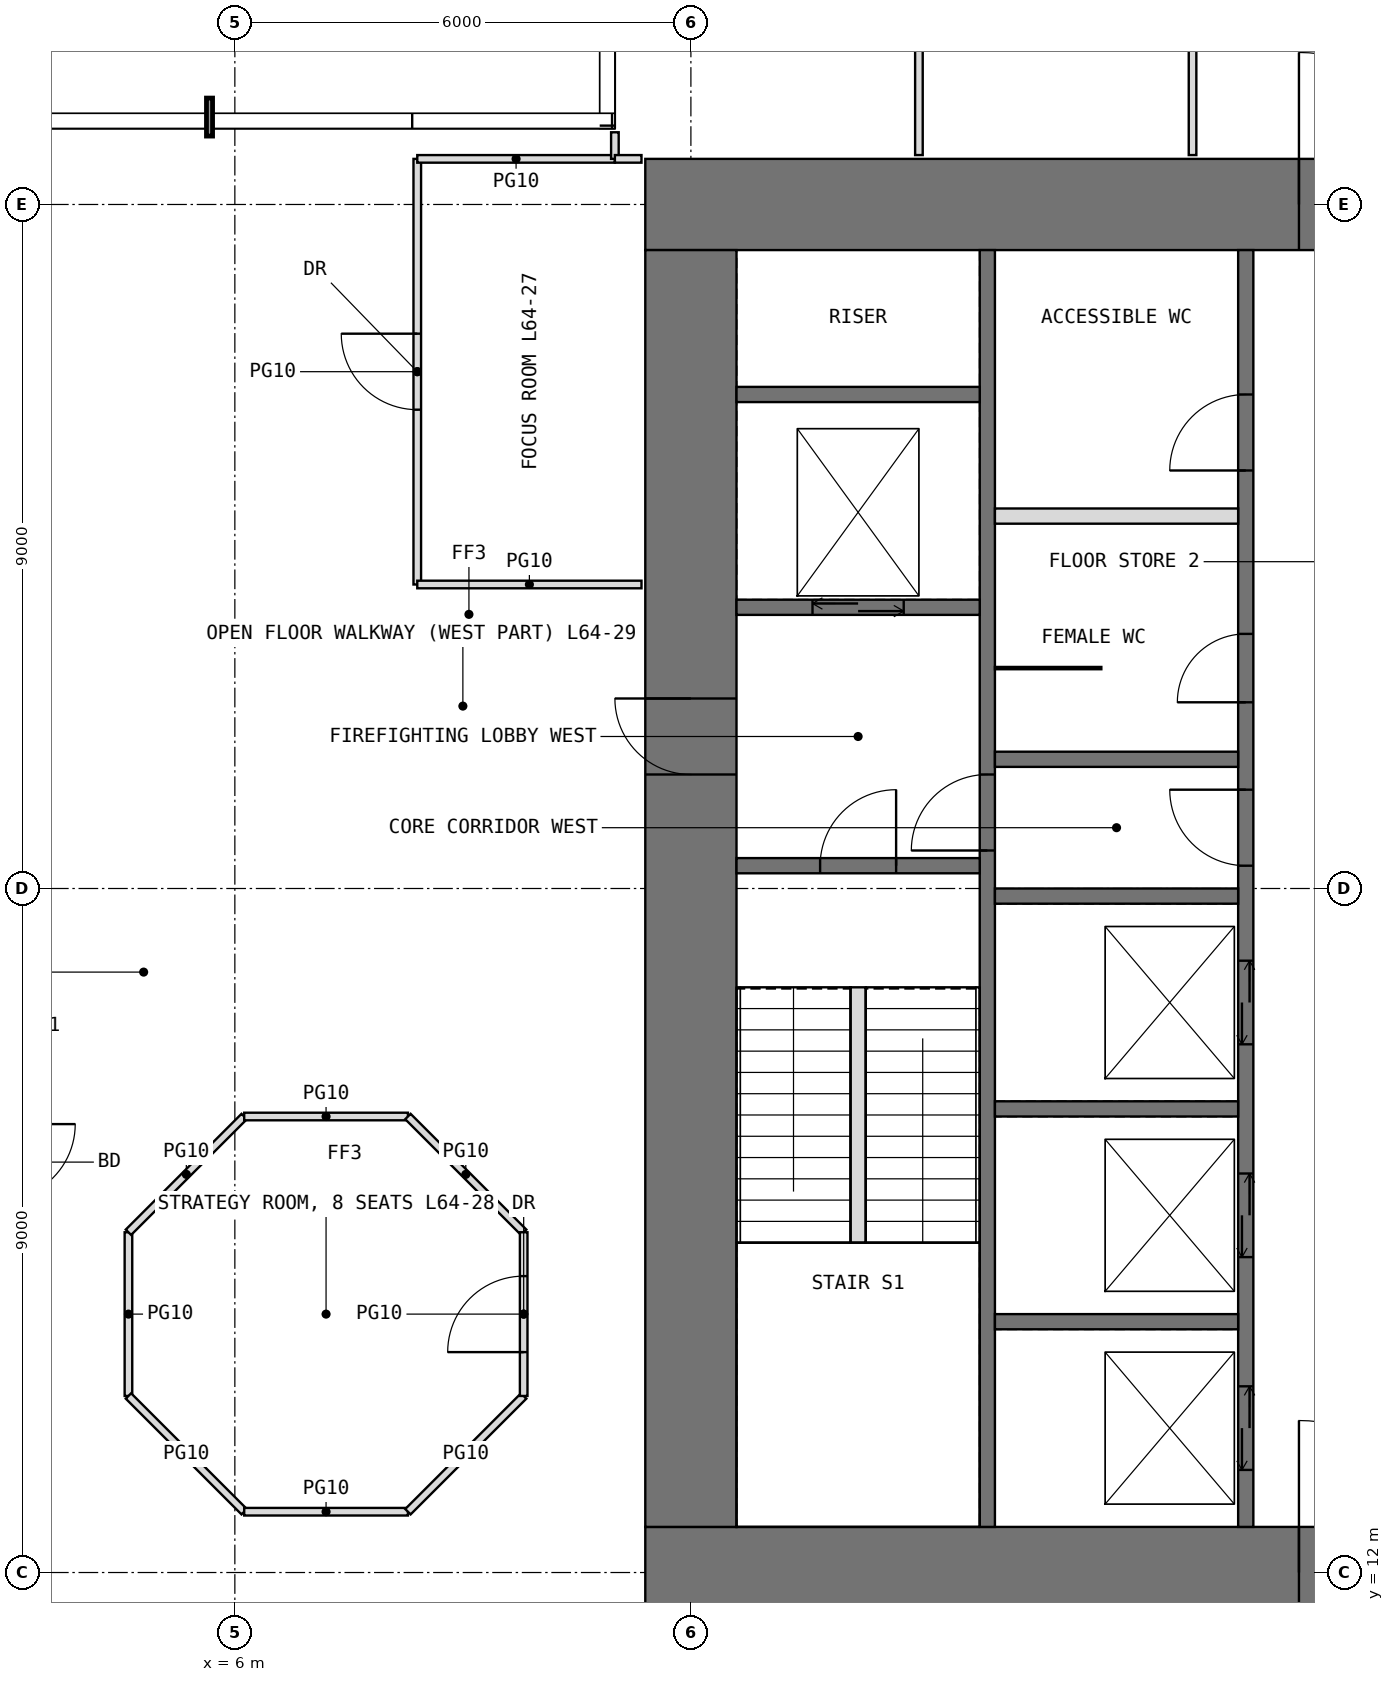
"""IFC4 building model, lengths in metres.
Left out: names, types, materials, properties, quantities, classifications, styles, units other than length and angle.
Written with IfcOpenShell. Run it as: python <this file> out.ifc"""

import sys

from ifc_helpers import new_model, si_unit, direction, frame, frame_2d, origin, place, context, subcontext, project, spatial, rectangle, extrude, element, fill, save


model = new_model("IFC4")
c1 = context("Model", 3, precision=1e-05, world=origin(), true_north=direction((0.0, 1.0)))
c2 = subcontext(c1, "Body", "Model", "MODEL_VIEW")
j1 = project(units=[si_unit("LENGTHUNIT", "METRE"), si_unit("PLANEANGLEUNIT", "RADIAN")], contexts=[c1])
p1 = place(None, origin())
s1 = spatial("IfcSite", under=j1, at=p1, CompositionType="ELEMENT")
p2 = place(p1, origin())
s2 = spatial("IfcBuilding", under=s1, at=p2, CompositionType="ELEMENT")
p3 = place(p2, frame((0.0, 0.0, 269.2)))
s3 = spatial("IfcBuildingStorey", under=s2, at=p3, CompositionType="ELEMENT", Elevation=269.2)
p4 = place(p3, frame((11.4, 12.0, -0.05), z_axis=(0.0, 0.0, 1.0), x_axis=(1.0, 0.0, 0.0)))
e1 = element("IfcWall", 1, at=p4, inside=s3, PredefinedType="SHEAR", context=c2, shape_type="SweptSolid", body=[
    extrude(rectangle(XDim=19.2, YDim=1.2, at=frame_2d((9.6, 0.0))), origin(), (0.0, 0.0, 1.0), 4.2),
])
p5 = place(p4, frame((8.6, 0.0, 0.05)))
e2 = element("IfcOpeningElement", 2, at=p5, cuts=e1, PredefinedType="OPENING", context=c2, shape_type="SweptSolid", body=[
    extrude(rectangle(XDim=2.0, YDim=2.2, at=frame_2d((1.0, 1.1))), frame((0.0, 0.61, 0.0), z_axis=(0.0, -1.0, 0.0), x_axis=(1.0, 0.0, 0.0)), (0.0, 0.0, 1.0), 1.22),
])
p6 = place(p3, frame((11.4, 30.0, -0.05), z_axis=(0.0, 0.0, 1.0), x_axis=(1.0, 0.0, 0.0)))
e3 = element("IfcWall", 3, at=p6, inside=s3, PredefinedType="SHEAR", context=c2, shape_type="SweptSolid", body=[
    extrude(rectangle(XDim=19.2, YDim=1.2, at=frame_2d((9.6, 0.0))), origin(), (0.0, 0.0, 1.0), 4.2),
])
p7 = place(p6, frame((8.6, 0.0, 0.05)))
e4 = element("IfcOpeningElement", 4, at=p7, cuts=e3, PredefinedType="OPENING", context=c2, shape_type="SweptSolid", body=[
    extrude(rectangle(XDim=2.0, YDim=2.2, at=frame_2d((1.0, 1.1))), frame((0.0, 0.61, 0.0), z_axis=(0.0, -1.0, 0.0), x_axis=(1.0, 0.0, 0.0)), (0.0, 0.0, 1.0), 1.22),
])
p8 = place(p3, frame((12.0, 12.6, -0.05), z_axis=(0.0, 0.0, 1.0), x_axis=(0.0, 1.0, 0.0)))
e5 = element("IfcWall", 5, at=p8, inside=s3, PredefinedType="SHEAR", context=c2, shape_type="SweptSolid", body=[
    extrude(rectangle(XDim=16.8, YDim=1.2, at=frame_2d((8.4, 0.0))), origin(), (0.0, 0.0, 1.0), 4.2),
])
p9 = place(p8, frame((9.9, 0.0, 0.05)))
e6 = element("IfcOpeningElement", 6, at=p9, cuts=e5, PredefinedType="OPENING", context=c2, shape_type="SweptSolid", body=[
    extrude(rectangle(XDim=1.0, YDim=2.2, at=frame_2d((0.5, 1.1))), frame((0.0, 0.61, 0.0), z_axis=(0.0, -1.0, 0.0), x_axis=(1.0, 0.0, 0.0)), (0.0, 0.0, 1.0), 1.22),
])
p10 = place(p3, frame((15.9, 12.6, -0.05), z_axis=(0.0, 0.0, 1.0), x_axis=(0.0, 1.0, 0.0)))
e7 = element("IfcWall", 7, at=p10, inside=s3, PredefinedType="SHEAR", context=c2, shape_type="SweptSolid", body=[
    extrude(rectangle(XDim=16.8, YDim=0.2, at=frame_2d((8.4, 0.0))), origin(), (0.0, 0.0, 1.0), 4.2),
])
p11 = place(p10, frame((8.9, 0.0, 0.05)))
e8 = element("IfcOpeningElement", 8, at=p11, cuts=e7, PredefinedType="OPENING", context=c2, shape_type="SweptSolid", body=[
    extrude(rectangle(XDim=1.0, YDim=2.2, at=frame_2d((0.5, 1.1))), frame((0.0, 0.11, 0.0), z_axis=(0.0, -1.0, 0.0), x_axis=(1.0, 0.0, 0.0)), (0.0, 0.0, 1.0), 0.22),
])
p12 = place(p3, frame((19.3, 12.6, -0.05), z_axis=(0.0, 0.0, 1.0), x_axis=(0.0, 1.0, 0.0)))
e9 = element("IfcWall", 9, at=p12, inside=s3, PredefinedType="SHEAR", context=c2, shape_type="SweptSolid", body=[
    extrude(rectangle(XDim=16.8, YDim=0.2, at=frame_2d((8.4, 0.0))), origin(), (0.0, 0.0, 1.0), 4.2),
])
p13 = place(p12, frame((8.7, 0.0, 0.05)))
e10 = element("IfcOpeningElement", 10, at=p13, cuts=e9, PredefinedType="OPENING", context=c2, shape_type="SweptSolid", body=[
    extrude(rectangle(XDim=1.0, YDim=2.2, at=frame_2d((0.5, 1.1))), frame((0.0, 0.11, 0.0), z_axis=(0.0, -1.0, 0.0), x_axis=(1.0, 0.0, 0.0)), (0.0, 0.0, 1.0), 0.22),
])
p14 = place(p12, frame((10.85, 0.0, 0.05)))
e11 = element("IfcOpeningElement", 11, at=p14, cuts=e9, PredefinedType="OPENING", context=c2, shape_type="SweptSolid", body=[
    extrude(rectangle(XDim=0.9, YDim=2.2, at=frame_2d((0.45, 1.1))), frame((0.0, 0.11, 0.0), z_axis=(0.0, -1.0, 0.0), x_axis=(1.0, 0.0, 0.0)), (0.0, 0.0, 1.0), 0.22),
])
p15 = place(p12, frame((13.9, 0.0, 0.05)))
e12 = element("IfcOpeningElement", 12, at=p15, cuts=e9, PredefinedType="OPENING", context=c2, shape_type="SweptSolid", body=[
    extrude(rectangle(XDim=1.0, YDim=2.2, at=frame_2d((0.5, 1.1))), frame((0.0, 0.11, 0.0), z_axis=(0.0, -1.0, 0.0), x_axis=(1.0, 0.0, 0.0)), (0.0, 0.0, 1.0), 0.22),
])
p16 = place(p12, frame((0.75, 0.0, 0.05)))
e13 = element("IfcOpeningElement", 13, at=p16, cuts=e9, PredefinedType="OPENING", context=c2, shape_type="SweptSolid", body=[
    extrude(rectangle(XDim=1.1, YDim=2.2, at=frame_2d((0.55, 1.1))), frame((0.0, 0.11, 0.0), z_axis=(0.0, -1.0, 0.0), x_axis=(1.0, 0.0, 0.0)), (0.0, 0.0, 1.0), 0.22),
])
p17 = place(p12, frame((3.55, 0.0, 0.05)))
e14 = element("IfcOpeningElement", 14, at=p17, cuts=e9, PredefinedType="OPENING", context=c2, shape_type="SweptSolid", body=[
    extrude(rectangle(XDim=1.1, YDim=2.2, at=frame_2d((0.55, 1.1))), frame((0.0, 0.11, 0.0), z_axis=(0.0, -1.0, 0.0), x_axis=(1.0, 0.0, 0.0)), (0.0, 0.0, 1.0), 0.22),
])
p18 = place(p12, frame((6.35, 0.0, 0.05)))
e15 = element("IfcOpeningElement", 15, at=p18, cuts=e9, PredefinedType="OPENING", context=c2, shape_type="SweptSolid", body=[
    extrude(rectangle(XDim=1.1, YDim=2.2, at=frame_2d((0.55, 1.1))), frame((0.0, 0.11, 0.0), z_axis=(0.0, -1.0, 0.0), x_axis=(1.0, 0.0, 0.0)), (0.0, 0.0, 1.0), 0.22),
])
p19 = place(p3, frame((12.6, 21.3, -0.05), z_axis=(0.0, 0.0, 1.0), x_axis=(1.0, 0.0, 0.0)))
e16 = element("IfcWall", 16, at=p19, inside=s3, PredefinedType="SHEAR", context=c2, shape_type="SweptSolid", body=[
    extrude(rectangle(XDim=3.2, YDim=0.2, at=frame_2d((1.6, 0.0))), origin(), (0.0, 0.0, 1.0), 4.2),
])
p20 = place(p19, frame((1.1, 0.0, 0.05)))
e17 = element("IfcOpeningElement", 17, at=p20, cuts=e16, PredefinedType="OPENING", context=c2, shape_type="SweptSolid", body=[
    extrude(rectangle(XDim=1.0, YDim=2.2, at=frame_2d((0.5, 1.1))), frame((0.0, 0.11, 0.0), z_axis=(0.0, -1.0, 0.0), x_axis=(1.0, 0.0, 0.0)), (0.0, 0.0, 1.0), 0.22),
])
p21 = place(p3, frame((12.6, 24.7, -0.05), z_axis=(0.0, 0.0, 1.0), x_axis=(1.0, 0.0, 0.0)))
e18 = element("IfcWall", 18, at=p21, inside=s3, PredefinedType="SHEAR", context=c2, shape_type="SweptSolid", body=[
    extrude(rectangle(XDim=3.2, YDim=0.2, at=frame_2d((1.6, 0.0))), origin(), (0.0, 0.0, 1.0), 4.2),
])
p22 = place(p21, frame((1.0, 0.0, 0.05)))
e19 = element("IfcOpeningElement", 19, at=p22, cuts=e18, PredefinedType="OPENING", context=c2, shape_type="SweptSolid", body=[
    extrude(rectangle(XDim=1.2, YDim=2.2, at=frame_2d((0.6, 1.1))), frame((0.0, 0.11, 0.0), z_axis=(0.0, -1.0, 0.0), x_axis=(1.0, 0.0, 0.0)), (0.0, 0.0, 1.0), 0.22),
])
for number, where, z_axis, x_axis in (
    (20, (12.6, 27.5, -0.05), (0.0, 0.0, 1.0), (1.0, 0.0, 0.0)),
    (21, (16.0, 15.3, -0.05), (0.0, 0.0, 1.0), (1.0, 0.0, 0.0)),
    (22, (16.0, 18.1, -0.05), (0.0, 0.0, 1.0), (1.0, 0.0, 0.0)),
    (23, (16.0, 20.9, -0.05), (0.0, 0.0, 1.0), (1.0, 0.0, 0.0)),
    (24, (16.0, 22.7, -0.05), (0.0, 0.0, 1.0), (1.0, 0.0, 0.0)),
):
    element("IfcWall", number, at=place(p3, frame(where, z_axis=z_axis, x_axis=x_axis)), inside=s3, PredefinedType="SHEAR", context=c2, shape_type="SweptSolid", body=[
        extrude(rectangle(XDim=3.2, YDim=0.2, at=frame_2d((1.6, 0.0))), origin(), (0.0, 0.0, 1.0), 4.2),
    ])
p23 = place(p3, frame((16.0, 25.9, 0.0), z_axis=(0.0, 0.0, 1.0), x_axis=(1.0, 0.0, 0.0)))
e25 = element("IfcWall", 25, at=p23, inside=s3, PredefinedType="PARTITIONING", context=c2, shape_type="SweptSolid", body=[
    extrude(rectangle(XDim=3.2, YDim=0.2, at=frame_2d((1.6, 0.0))), origin(), (0.0, 0.0, 1.0), 3.95),
])
p24 = place(p3, frame((16.0, 23.9, 0.0), z_axis=(0.0, 0.0, 1.0), x_axis=(1.0, 0.0, 0.0)))
e26 = element("IfcWall", 26, at=p24, inside=s3, PredefinedType="PARTITIONING", context=c2, shape_type="SweptSolid", body=[
    extrude(rectangle(XDim=1.4, YDim=0.03, at=frame_2d((0.7, 0.0))), origin(), (0.0, 0.0, 1.0), 3.95),
])
p25 = place(p3, frame((4.6, 14.323, 0.0), z_axis=(0.0, 0.0, 1.0), x_axis=(0.0, 1.0, 0.0)))
e27 = element("IfcWall", 27, at=p25, inside=s3, PredefinedType="PARTITIONING", context=c2, shape_type="SweptSolid", body=[
    extrude(rectangle(XDim=2.154, YDim=0.1, at=frame_2d((1.077, 0.0))), origin(), (0.0, 0.0, 1.0), 3.95),
])
for number, where, z_axis, x_axis in (
    (28, (4.6, 14.323, 0.0), (0.0, 0.0, 1.0), (0.707, -0.707, 0.0)),
    (29, (4.6, 16.477, 0.0), (0.0, 0.0, 1.0), (0.707, 0.707, 0.0)),
):
    element("IfcWall", number, at=place(p3, frame(where, z_axis=z_axis, x_axis=x_axis)), inside=s3, PredefinedType="PARTITIONING", context=c2, shape_type="SweptSolid", body=[
        extrude(rectangle(XDim=2.154, YDim=0.1, at=frame_2d((1.077, 0.0))), origin(), (0.0, 0.0, 1.0), 3.95),
    ])
for number, where, z_axis, x_axis in (
    (30, (6.123, 12.8, 0.0), (0.0, 0.0, 1.0), (1.0, 0.0, 0.0)),
    (31, (6.123, 18.0, 0.0), (0.0, 0.0, 1.0), (1.0, 0.0, 0.0)),
):
    element("IfcWall", number, at=place(p3, frame(where, z_axis=z_axis, x_axis=x_axis)), inside=s3, PredefinedType="PARTITIONING", context=c2, shape_type="SweptSolid", body=[
        extrude(rectangle(XDim=2.154, YDim=0.1, at=frame_2d((1.077, 0.0))), origin(), (0.0, 0.0, 1.0), 3.95),
    ])
for number, where, z_axis, x_axis in (
    (32, (8.277, 12.8, 0.0), (0.0, 0.0, 1.0), (0.707, 0.707, 0.0)),
    (33, (8.277, 18.0, 0.0), (0.0, 0.0, 1.0), (0.707, -0.707, 0.0)),
):
    element("IfcWall", number, at=place(p3, frame(where, z_axis=z_axis, x_axis=x_axis)), inside=s3, PredefinedType="PARTITIONING", context=c2, shape_type="SweptSolid", body=[
        extrude(rectangle(XDim=2.154, YDim=0.1, at=frame_2d((1.077, 0.0))), origin(), (0.0, 0.0, 1.0), 3.95),
    ])
p26 = place(p3, frame((8.4, 25.0, 0.0), z_axis=(0.0, 0.0, 1.0), x_axis=(0.0, 1.0, 0.0)))
e34 = element("IfcWall", 34, at=p26, inside=s3, PredefinedType="PARTITIONING", context=c2, shape_type="SweptSolid", body=[
    extrude(rectangle(XDim=5.6, YDim=0.1, at=frame_2d((2.8, 0.0))), origin(), (0.0, 0.0, 1.0), 3.95),
])
p27 = place(p26, frame((2.3, 0.0, 0.0)))
e35 = element("IfcOpeningElement", 35, at=p27, cuts=e34, PredefinedType="OPENING", context=c2, shape_type="SweptSolid", body=[
    extrude(rectangle(XDim=1.0, YDim=2.2, at=frame_2d((0.5, 1.1))), frame((0.0, 0.06, 0.0), z_axis=(0.0, -1.0, 0.0), x_axis=(1.0, 0.0, 0.0)), (0.0, 0.0, 1.0), 0.12),
])
p28 = place(p3, frame((8.4, 25.0, 0.0), z_axis=(0.0, 0.0, 1.0), x_axis=(1.0, 0.0, 0.0)))
e36 = element("IfcWall", 36, at=p28, inside=s3, PredefinedType="PARTITIONING", context=c2, shape_type="SweptSolid", body=[
    extrude(rectangle(XDim=2.95, YDim=0.1, at=frame_2d((1.475, 0.0))), origin(), (0.0, 0.0, 1.0), 3.95),
])
p29 = place(p3, frame((8.4, 30.6, 0.0), z_axis=(0.0, 0.0, 1.0), x_axis=(1.0, 0.0, 0.0)))
e37 = element("IfcWall", 37, at=p29, inside=s3, PredefinedType="PARTITIONING", context=c2, shape_type="SweptSolid", body=[
    extrude(rectangle(XDim=2.6, YDim=0.1, at=frame_2d((1.3, 0.0))), origin(), (0.0, 0.0, 1.0), 3.95),
])
p30 = place(p3, frame((9.8, 14.323, 0.0), z_axis=(0.0, 0.0, 1.0), x_axis=(0.0, 1.0, 0.0)))
e38 = element("IfcWall", 38, at=p30, inside=s3, PredefinedType="PARTITIONING", context=c2, shape_type="SweptSolid", body=[
    extrude(rectangle(XDim=2.154, YDim=0.1, at=frame_2d((1.077, 0.0))), origin(), (0.0, 0.0, 1.0), 3.95),
])
p31 = place(p30, frame((0.577, 0.0, 0.0)))
e39 = element("IfcOpeningElement", 39, at=p31, cuts=e38, PredefinedType="OPENING", context=c2, shape_type="SweptSolid", body=[
    extrude(rectangle(XDim=1.0, YDim=2.2, at=frame_2d((0.5, 1.1))), frame((0.0, 0.06, 0.0), z_axis=(0.0, -1.0, 0.0), x_axis=(1.0, 0.0, 0.0)), (0.0, 0.0, 1.0), 0.12),
])
p32 = place(p3, frame((11.0, 30.6, 0.0), z_axis=(0.0, 0.0, 1.0), x_axis=(0.0, 1.0, 0.0)))
e40 = element("IfcWall", 40, at=p32, inside=s3, PredefinedType="PARTITIONING", context=c2, shape_type="SweptSolid", body=[
    extrude(rectangle(XDim=0.35, YDim=0.1, at=frame_2d((0.175, 0.0))), origin(), (0.0, 0.0, 1.0), 3.95),
])
p33 = place(p3, frame((11.0, 30.6, 0.0), z_axis=(0.0, 0.0, 1.0), x_axis=(1.0, 0.0, 0.0)))
e41 = element("IfcWall", 41, at=p33, inside=s3, PredefinedType="PARTITIONING", context=c2, shape_type="SweptSolid", body=[
    extrude(rectangle(XDim=0.35, YDim=0.1, at=frame_2d((0.175, 0.0))), origin(), (0.0, 0.0, 1.0), 3.95),
])
p34 = place(p3, frame((15.0, 30.65, 0.0), z_axis=(0.0, 0.0, 1.0), x_axis=(0.0, 1.0, 0.0)))
e42 = element("IfcWall", 42, at=p34, inside=s3, PredefinedType="PARTITIONING", context=c2, shape_type="SweptSolid", body=[
    extrude(rectangle(XDim=3.45, YDim=0.1, at=frame_2d((1.725, 0.0))), origin(), (0.0, 0.0, 1.0), 3.95),
])
p35 = place(p3, frame((18.6, 30.65, 0.0), z_axis=(0.0, 0.0, 1.0), x_axis=(0.0, 1.0, 0.0)))
e43 = element("IfcWall", 43, at=p35, inside=s3, PredefinedType="PARTITIONING", context=c2, shape_type="SweptSolid", body=[
    extrude(rectangle(XDim=3.95, YDim=0.1, at=frame_2d((1.975, 0.0))), origin(), (0.0, 0.0, 1.0), 3.95),
])
p36 = place(p3, frame((14.2, 16.34, 0.0), z_axis=(0.0, 0.0, 1.0), x_axis=(0.0, 1.0, 0.0)))
e44 = element("IfcWall", 44, at=p36, inside=s3, PredefinedType="PARTITIONING", context=c2, shape_type="SweptSolid", body=[
    extrude(rectangle(XDim=3.36, YDim=0.2, at=frame_2d((1.68, 0.0))), origin(), (0.0, 0.0, 1.0), 4.2),
])
p37 = place(p5, origin())
e45 = element("IfcDoor", 45, at=p37, inside=s3, OperationType="DOUBLE_DOOR_SINGLE_SWING", PredefinedType="DOOR", context=c2, shape_type="SweptSolid", body=[
    extrude(rectangle(XDim=2.0, YDim=2.2, at=frame_2d((1.0, 1.1))), frame((0.0, 0.025, 0.0), z_axis=(0.0, -1.0, 0.0), x_axis=(1.0, 0.0, 0.0)), (0.0, 0.0, 1.0), 0.05),
])
fill(e2, e45)
p38 = place(p7, origin())
e46 = element("IfcDoor", 46, at=p38, inside=s3, OperationType="DOUBLE_DOOR_SINGLE_SWING", PredefinedType="DOOR", context=c2, shape_type="SweptSolid", body=[
    extrude(rectangle(XDim=2.0, YDim=2.2, at=frame_2d((1.0, 1.1))), frame((0.0, 0.025, 0.0), z_axis=(0.0, -1.0, 0.0), x_axis=(1.0, 0.0, 0.0)), (0.0, 0.0, 1.0), 0.05),
])
fill(e4, e46)
p39 = place(p9, origin())
e47 = element("IfcDoor", 47, at=p39, inside=s3, OperationType="SINGLE_SWING_RIGHT", PredefinedType="DOOR", context=c2, shape_type="SweptSolid", body=[
    extrude(rectangle(XDim=1.0, YDim=2.2, at=frame_2d((0.5, 1.1))), frame((0.0, 0.025, 0.0), z_axis=(0.0, -1.0, 0.0), x_axis=(1.0, 0.0, 0.0)), (0.0, 0.0, 1.0), 0.05),
])
fill(e6, e47)
p40 = place(p20, origin())
e48 = element("IfcDoor", 48, at=p40, inside=s3, OperationType="SINGLE_SWING_RIGHT", PredefinedType="DOOR", context=c2, shape_type="SweptSolid", body=[
    extrude(rectangle(XDim=1.0, YDim=2.2, at=frame_2d((0.5, 1.1))), frame((0.0, 0.025, 0.0), z_axis=(0.0, -1.0, 0.0), x_axis=(1.0, 0.0, 0.0)), (0.0, 0.0, 1.0), 0.05),
])
fill(e17, e48)
p41 = place(p11, origin())
e49 = element("IfcDoor", 49, at=p41, inside=s3, OperationType="SINGLE_SWING_LEFT", PredefinedType="DOOR", context=c2, shape_type="SweptSolid", body=[
    extrude(rectangle(XDim=1.0, YDim=2.2, at=frame_2d((0.5, 1.1))), frame((0.0, 0.025, 0.0), z_axis=(0.0, -1.0, 0.0), x_axis=(1.0, 0.0, 0.0)), (0.0, 0.0, 1.0), 0.05),
])
fill(e8, e49)
p42 = place(p13, origin())
e50 = element("IfcDoor", 50, at=p42, inside=s3, OperationType="SINGLE_SWING_RIGHT", PredefinedType="DOOR", context=c2, shape_type="SweptSolid", body=[
    extrude(rectangle(XDim=1.0, YDim=2.2, at=frame_2d((0.5, 1.1))), frame((0.0, 0.025, 0.0), z_axis=(0.0, -1.0, 0.0), x_axis=(1.0, 0.0, 0.0)), (0.0, 0.0, 1.0), 0.05),
])
fill(e10, e50)
p43 = place(p14, origin())
e51 = element("IfcDoor", 51, at=p43, inside=s3, OperationType="SINGLE_SWING_LEFT", PredefinedType="DOOR", context=c2, shape_type="SweptSolid", body=[
    extrude(rectangle(XDim=0.9, YDim=2.2, at=frame_2d((0.45, 1.1))), frame((0.0, 0.025, 0.0), z_axis=(0.0, -1.0, 0.0), x_axis=(1.0, 0.0, 0.0)), (0.0, 0.0, 1.0), 0.05),
])
fill(e11, e51)
p44 = place(p15, origin())
e52 = element("IfcDoor", 52, at=p44, inside=s3, OperationType="SINGLE_SWING_LEFT", PredefinedType="DOOR", context=c2, shape_type="SweptSolid", body=[
    extrude(rectangle(XDim=1.0, YDim=2.2, at=frame_2d((0.5, 1.1))), frame((0.0, 0.025, 0.0), z_axis=(0.0, -1.0, 0.0), x_axis=(1.0, 0.0, 0.0)), (0.0, 0.0, 1.0), 0.05),
])
fill(e12, e52)
p45 = place(p27, origin())
e53 = element("IfcDoor", 53, at=p45, inside=s3, OperationType="SINGLE_SWING_RIGHT", PredefinedType="DOOR", context=c2, shape_type="SweptSolid", body=[
    extrude(rectangle(XDim=1.0, YDim=2.2, at=frame_2d((0.5, 1.1))), frame((0.0, 0.025, 0.0), z_axis=(0.0, -1.0, 0.0), x_axis=(1.0, 0.0, 0.0)), (0.0, 0.0, 1.0), 0.05),
])
fill(e35, e53)
p46 = place(p31, origin())
e54 = element("IfcDoor", 54, at=p46, inside=s3, OperationType="SINGLE_SWING_LEFT", PredefinedType="DOOR", context=c2, shape_type="SweptSolid", body=[
    extrude(rectangle(XDim=1.0, YDim=2.2, at=frame_2d((0.5, 1.1))), frame((0.0, 0.025, 0.0), z_axis=(0.0, -1.0, 0.0), x_axis=(1.0, 0.0, 0.0)), (0.0, 0.0, 1.0), 0.05),
])
fill(e39, e54)
p47 = place(p16, origin())
e55 = element("IfcDoor", 55, at=p47, inside=s3, OperationType="DOUBLE_DOOR_SLIDING", PredefinedType="DOOR", context=c2, shape_type="SweptSolid", body=[
    extrude(rectangle(XDim=1.1, YDim=2.2, at=frame_2d((0.55, 1.1))), frame((0.0, 0.025, 0.0), z_axis=(0.0, -1.0, 0.0), x_axis=(1.0, 0.0, 0.0)), (0.0, 0.0, 1.0), 0.05),
])
fill(e13, e55)
p48 = place(p17, origin())
e56 = element("IfcDoor", 56, at=p48, inside=s3, OperationType="DOUBLE_DOOR_SLIDING", PredefinedType="DOOR", context=c2, shape_type="SweptSolid", body=[
    extrude(rectangle(XDim=1.1, YDim=2.2, at=frame_2d((0.55, 1.1))), frame((0.0, 0.025, 0.0), z_axis=(0.0, -1.0, 0.0), x_axis=(1.0, 0.0, 0.0)), (0.0, 0.0, 1.0), 0.05),
])
fill(e14, e56)
p49 = place(p18, origin())
e57 = element("IfcDoor", 57, at=p49, inside=s3, OperationType="DOUBLE_DOOR_SLIDING", PredefinedType="DOOR", context=c2, shape_type="SweptSolid", body=[
    extrude(rectangle(XDim=1.1, YDim=2.2, at=frame_2d((0.55, 1.1))), frame((0.0, 0.025, 0.0), z_axis=(0.0, -1.0, 0.0), x_axis=(1.0, 0.0, 0.0)), (0.0, 0.0, 1.0), 0.05),
])
fill(e15, e57)
p50 = place(p22, origin())
e58 = element("IfcDoor", 58, at=p50, inside=s3, OperationType="DOUBLE_DOOR_SLIDING", PredefinedType="DOOR", context=c2, shape_type="SweptSolid", body=[
    extrude(rectangle(XDim=1.2, YDim=2.2, at=frame_2d((0.6, 1.1))), frame((0.0, 0.025, 0.0), z_axis=(0.0, -1.0, 0.0), x_axis=(1.0, 0.0, 0.0)), (0.0, 0.0, 1.0), 0.05),
])
fill(e19, e58)
save(model, sys.argv[1])
